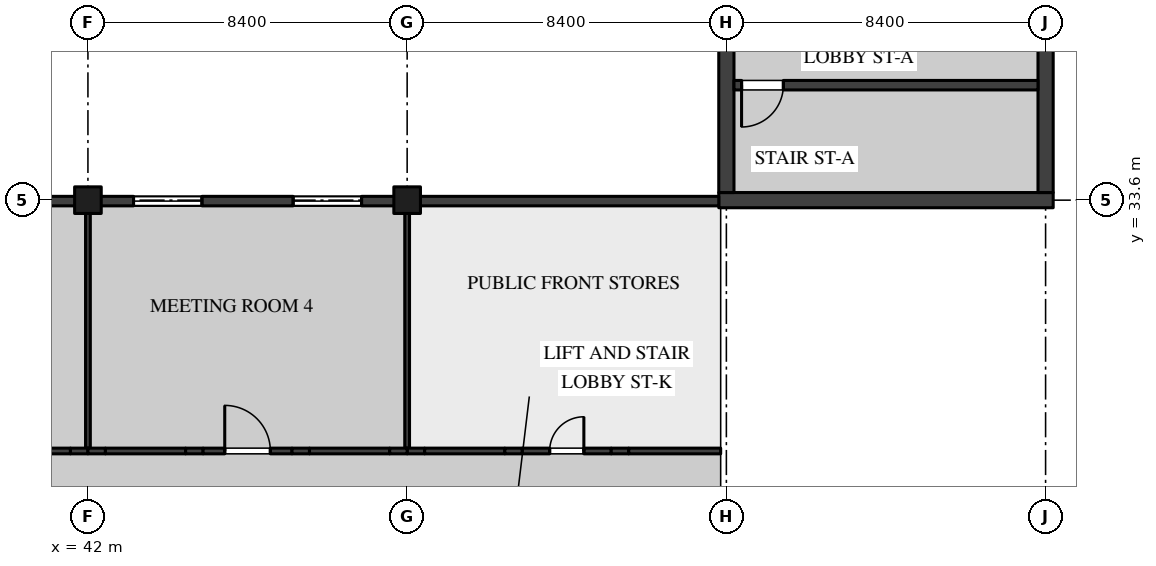
"""IFC4 building model, lengths in metres.
Left out: names, types, materials, properties, quantities, classifications, styles, units other than length and angle.
Written with IfcOpenShell. Run it as: python <this file> out.ifc"""

import sys

from ifc_helpers import new_model, si_unit, direction, frame, frame_2d, origin, origin_2d, place, context, subcontext, project, spatial, rectangle, extrude, element, fill, save


model = new_model("IFC4")
c1 = context("Model", 3, precision=1e-05, world=origin(), true_north=direction((0.0, 1.0)))
c2 = subcontext(c1, "Body", "Model", "MODEL_VIEW")
j1 = project(units=[si_unit("LENGTHUNIT", "METRE"), si_unit("PLANEANGLEUNIT", "RADIAN")], contexts=[c1])
p1 = place(None, origin())
s1 = spatial("IfcSite", under=j1, at=p1, CompositionType="ELEMENT")
p2 = place(p1, origin())
s2 = spatial("IfcBuilding", under=s1, at=p2, CompositionType="ELEMENT")
p3 = place(p2, frame((0.0, 0.0, 5.4)))
s3 = spatial("IfcBuildingStorey", under=s2, at=p3, CompositionType="ELEMENT", Elevation=5.4)
for number, where, z_axis, x_axis in (
    (1, (42.0, 33.6, 0.0), (0.0, 0.0, 1.0), (1.0, 0.0, 0.0)),
    (2, (50.4, 33.6, 0.0), (0.0, 0.0, 1.0), (1.0, 0.0, 0.0)),
):
    element("IfcColumn", number, at=place(p3, frame(where, z_axis=z_axis, x_axis=x_axis)), inside=s3, PredefinedType="COLUMN", context=c2, shape_type="SweptSolid", body=[
        extrude(rectangle(XDim=0.7, YDim=0.7, at=origin_2d()), origin(), (0.0, 0.0, 1.0), 4.37),
    ])
p4 = place(p3, frame((58.6, 33.6, 0.0), z_axis=(0.0, 0.0, 1.0), x_axis=(1.0, 0.0, 0.0)))
e3 = element("IfcWall", 3, at=p4, inside=s3, PredefinedType="SHEAR", context=c2, shape_type="SweptSolid", body=[
    extrude(rectangle(XDim=8.8, YDim=0.4, at=frame_2d((4.4, 0.0))), origin(), (0.0, 0.0, 1.0), 4.25),
])
for number, where, z_axis, x_axis in (
    (4, (58.8, 33.8, 0.0), (0.0, 0.0, 1.0), (0.0, 1.0, 0.0)),
    (5, (67.2, 33.8, 0.0), (0.0, 0.0, 1.0), (0.0, 1.0, 0.0)),
):
    element("IfcWall", number, at=place(p3, frame(where, z_axis=z_axis, x_axis=x_axis)), inside=s3, PredefinedType="SHEAR", context=c2, shape_type="SweptSolid", body=[
        extrude(rectangle(XDim=8.0, YDim=0.4, at=frame_2d((4.0, 0.0))), origin(), (0.0, 0.0, 1.0), 4.25),
    ])
p5 = place(p3, frame((59.0, 36.625, 0.0), z_axis=(0.0, 0.0, 1.0), x_axis=(1.0, 0.0, 0.0)))
e6 = element("IfcWall", 6, at=p5, inside=s3, PredefinedType="SOLIDWALL", context=c2, shape_type="SweptSolid", body=[
    extrude(rectangle(XDim=8.0, YDim=0.25, at=frame_2d((4.0, 0.0))), origin(), (0.0, 0.0, 1.0), 4.25),
])
p6 = place(p5, frame((0.2, 0.0, 0.0)))
e7 = element("IfcOpeningElement", 7, at=p6, cuts=e6, PredefinedType="OPENING", context=c2, shape_type="SweptSolid", body=[
    extrude(rectangle(XDim=1.1, YDim=2.1, at=frame_2d((0.55, 1.05))), frame((0.0, 0.135, 0.0), z_axis=(0.0, -1.0, 0.0), x_axis=(1.0, 0.0, 0.0)), (0.0, 0.0, 1.0), 0.27),
])
p7 = place(p3, frame((42.0, 27.075, 0.0), z_axis=(0.0, 0.0, 1.0), x_axis=(0.0, 1.0, 0.0)))
e8 = element("IfcWall", 8, at=p7, inside=s3, PredefinedType="PARTITIONING", context=c2, shape_type="SweptSolid", body=[
    extrude(rectangle(XDim=6.175, YDim=0.125, at=frame_2d((3.087, 0.0))), origin(), (0.0, 0.0, 1.0), 3.746),
])
p8 = place(p3, frame((39.43, 27.0, 0.0), z_axis=(0.0, 0.0, 1.0), x_axis=(1.0, 0.0, 0.0)))
e9 = element("IfcWall", 9, at=p8, inside=s3, PredefinedType="PARTITIONING", context=c2, shape_type="SweptSolid", body=[
    extrude(rectangle(XDim=2.11, YDim=0.15, at=frame_2d((1.055, 0.0))), origin(), (0.0, 0.0, 1.0), 4.37),
])
p9 = place(p3, frame((41.54, 27.0, 0.0), z_axis=(0.0, 0.0, 1.0), x_axis=(1.0, 0.0, 0.0)))
e10 = element("IfcWall", 10, at=p9, inside=s3, PredefinedType="PARTITIONING", context=c2, shape_type="SweptSolid", body=[
    extrude(rectangle(XDim=0.46, YDim=0.15, at=frame_2d((0.23, 0.0))), origin(), (0.0, 0.0, 1.0), 3.746),
])
p10 = place(p3, frame((50.4, 27.075, 0.0), z_axis=(0.0, 0.0, 1.0), x_axis=(0.0, 1.0, 0.0)))
e11 = element("IfcWall", 11, at=p10, inside=s3, PredefinedType="PARTITIONING", context=c2, shape_type="SweptSolid", body=[
    extrude(rectangle(XDim=6.175, YDim=0.125, at=frame_2d((3.087, 0.0))), origin(), (0.0, 0.0, 1.0), 3.746),
])
p11 = place(p3, frame((50.4, 27.0, 0.0), z_axis=(0.0, 0.0, 1.0), x_axis=(1.0, 0.0, 0.0)))
e12 = element("IfcWall", 12, at=p11, inside=s3, PredefinedType="PARTITIONING", context=c2, shape_type="SweptSolid", body=[
    extrude(rectangle(XDim=0.46, YDim=0.15, at=frame_2d((0.23, 0.0))), origin(), (0.0, 0.0, 1.0), 3.746),
])
p12 = place(p3, frame((50.86, 27.0, 0.0), z_axis=(0.0, 0.0, 1.0), x_axis=(1.0, 0.0, 0.0)))
e13 = element("IfcWall", 13, at=p12, inside=s3, PredefinedType="PARTITIONING", context=c2, shape_type="SweptSolid", body=[
    extrude(rectangle(XDim=2.11, YDim=0.15, at=frame_2d((1.055, 0.0))), origin(), (0.0, 0.0, 1.0), 4.37),
])
p13 = place(p3, frame((52.97, 27.0, 0.0), z_axis=(0.0, 0.0, 1.0), x_axis=(1.0, 0.0, 0.0)))
e14 = element("IfcWall", 14, at=p13, inside=s3, PredefinedType="PARTITIONING", context=c2, shape_type="SweptSolid", body=[
    extrude(rectangle(XDim=0.46, YDim=0.15, at=frame_2d((0.23, 0.0))), origin(), (0.0, 0.0, 1.0), 3.895),
])
p14 = place(p3, frame((53.43, 27.0, 0.0), z_axis=(0.0, 0.0, 1.0), x_axis=(1.0, 0.0, 0.0)))
e15 = element("IfcWall", 15, at=p14, inside=s3, PredefinedType="PARTITIONING", context=c2, shape_type="SweptSolid", body=[
    extrude(rectangle(XDim=2.34, YDim=0.15, at=frame_2d((1.17, 0.0))), origin(), (0.0, 0.0, 1.0), 4.37),
])
p15 = place(p14, frame((0.72, 0.0, 0.0)))
e16 = element("IfcOpeningElement", 16, at=p15, cuts=e15, PredefinedType="OPENING", context=c2, shape_type="SweptSolid", body=[
    extrude(rectangle(XDim=0.9, YDim=2.1, at=frame_2d((0.45, 1.05))), frame((0.0, 0.085, 0.0), z_axis=(0.0, -1.0, 0.0), x_axis=(1.0, 0.0, 0.0)), (0.0, 0.0, 1.0), 0.17),
])
p16 = place(p3, frame((55.77, 27.0, 0.0), z_axis=(0.0, 0.0, 1.0), x_axis=(1.0, 0.0, 0.0)))
e17 = element("IfcWall", 17, at=p16, inside=s3, PredefinedType="PARTITIONING", context=c2, shape_type="SweptSolid", body=[
    extrude(rectangle(XDim=0.46, YDim=0.15, at=frame_2d((0.23, 0.0))), origin(), (0.0, 0.0, 1.0), 3.895),
])
p17 = place(p3, frame((56.23, 27.0, 0.0), z_axis=(0.0, 0.0, 1.0), x_axis=(1.0, 0.0, 0.0)))
e18 = element("IfcWall", 18, at=p17, inside=s3, PredefinedType="PARTITIONING", context=c2, shape_type="SweptSolid", body=[
    extrude(rectangle(XDim=2.42, YDim=0.15, at=frame_2d((1.21, 0.0))), origin(), (0.0, 0.0, 1.0), 4.37),
])
p18 = place(p3, frame((42.0, 27.0, 0.0), z_axis=(0.0, 0.0, 1.0), x_axis=(1.0, 0.0, 0.0)))
e19 = element("IfcWall", 19, at=p18, inside=s3, PredefinedType="PARTITIONING", context=c2, shape_type="SweptSolid", body=[
    extrude(rectangle(XDim=0.46, YDim=0.15, at=frame_2d((0.23, 0.0))), origin(), (0.0, 0.0, 1.0), 3.746),
])
p19 = place(p3, frame((42.46, 27.0, 0.0), z_axis=(0.0, 0.0, 1.0), x_axis=(1.0, 0.0, 0.0)))
e20 = element("IfcWall", 20, at=p19, inside=s3, PredefinedType="PARTITIONING", context=c2, shape_type="SweptSolid", body=[
    extrude(rectangle(XDim=2.11, YDim=0.15, at=frame_2d((1.055, 0.0))), origin(), (0.0, 0.0, 1.0), 4.37),
])
p20 = place(p3, frame((44.57, 27.0, 0.0), z_axis=(0.0, 0.0, 1.0), x_axis=(1.0, 0.0, 0.0)))
e21 = element("IfcWall", 21, at=p20, inside=s3, PredefinedType="PARTITIONING", context=c2, shape_type="SweptSolid", body=[
    extrude(rectangle(XDim=0.46, YDim=0.15, at=frame_2d((0.23, 0.0))), origin(), (0.0, 0.0, 1.0), 3.895),
])
p21 = place(p3, frame((45.03, 27.0, 0.0), z_axis=(0.0, 0.0, 1.0), x_axis=(1.0, 0.0, 0.0)))
e22 = element("IfcWall", 22, at=p21, inside=s3, PredefinedType="PARTITIONING", context=c2, shape_type="SweptSolid", body=[
    extrude(rectangle(XDim=2.34, YDim=0.15, at=frame_2d((1.17, 0.0))), origin(), (0.0, 0.0, 1.0), 4.37),
])
p22 = place(p21, frame((0.57, 0.0, 0.0)))
e23 = element("IfcOpeningElement", 23, at=p22, cuts=e22, PredefinedType="OPENING", context=c2, shape_type="SweptSolid", body=[
    extrude(rectangle(XDim=1.2, YDim=2.4, at=frame_2d((0.6, 1.2))), frame((0.0, 0.085, 0.0), z_axis=(0.0, -1.0, 0.0), x_axis=(1.0, 0.0, 0.0)), (0.0, 0.0, 1.0), 0.17),
])
p23 = place(p3, frame((47.37, 27.0, 0.0), z_axis=(0.0, 0.0, 1.0), x_axis=(1.0, 0.0, 0.0)))
e24 = element("IfcWall", 24, at=p23, inside=s3, PredefinedType="PARTITIONING", context=c2, shape_type="SweptSolid", body=[
    extrude(rectangle(XDim=0.46, YDim=0.15, at=frame_2d((0.23, 0.0))), origin(), (0.0, 0.0, 1.0), 3.895),
])
p24 = place(p3, frame((47.83, 27.0, 0.0), z_axis=(0.0, 0.0, 1.0), x_axis=(1.0, 0.0, 0.0)))
e25 = element("IfcWall", 25, at=p24, inside=s3, PredefinedType="PARTITIONING", context=c2, shape_type="SweptSolid", body=[
    extrude(rectangle(XDim=2.11, YDim=0.15, at=frame_2d((1.055, 0.0))), origin(), (0.0, 0.0, 1.0), 4.37),
])
p25 = place(p3, frame((49.94, 27.0, 0.0), z_axis=(0.0, 0.0, 1.0), x_axis=(1.0, 0.0, 0.0)))
e26 = element("IfcWall", 26, at=p25, inside=s3, PredefinedType="PARTITIONING", context=c2, shape_type="SweptSolid", body=[
    extrude(rectangle(XDim=0.46, YDim=0.15, at=frame_2d((0.23, 0.0))), origin(), (0.0, 0.0, 1.0), 3.746),
])
p26 = place(p3, frame((58.6, 33.575, 0.0), z_axis=(0.0, 0.0, 1.0), x_axis=(-1.0, 0.0, 0.0)))
e27 = element("IfcWall", 27, at=p26, inside=s3, PredefinedType="SOLIDWALL", context=c2, shape_type="SweptSolid", body=[
    extrude(rectangle(XDim=7.87, YDim=0.25, at=frame_2d((3.935, 0.0))), origin(), (0.0, 0.0, 1.0), 3.746),
])
p27 = place(p3, frame((50.07, 33.575, 0.0), z_axis=(0.0, 0.0, 1.0), x_axis=(-1.0, 0.0, 0.0)))
e28 = element("IfcWall", 28, at=p27, inside=s3, PredefinedType="SOLIDWALL", context=c2, shape_type="SweptSolid", body=[
    extrude(rectangle(XDim=7.74, YDim=0.25, at=frame_2d((3.87, 0.0))), origin(), (0.0, 0.0, 1.0), 3.746),
])
p28 = place(p27, frame((0.87, 0.0, 0.9)))
e29 = element("IfcOpeningElement", 29, at=p28, cuts=e28, PredefinedType="OPENING", context=c2, shape_type="SweptSolid", body=[
    extrude(rectangle(XDim=1.8, YDim=2.4, at=frame_2d((0.9, 1.2))), frame((0.0, 0.135, 0.0), z_axis=(0.0, -1.0, 0.0), x_axis=(1.0, 0.0, 0.0)), (0.0, 0.0, 1.0), 0.27),
])
p29 = place(p27, frame((5.07, 0.0, 0.9)))
e30 = element("IfcOpeningElement", 30, at=p29, cuts=e28, PredefinedType="OPENING", context=c2, shape_type="SweptSolid", body=[
    extrude(rectangle(XDim=1.8, YDim=2.4, at=frame_2d((0.9, 1.2))), frame((0.0, 0.135, 0.0), z_axis=(0.0, -1.0, 0.0), x_axis=(1.0, 0.0, 0.0)), (0.0, 0.0, 1.0), 0.27),
])
p30 = place(p3, frame((41.67, 33.575, 0.0), z_axis=(0.0, 0.0, 1.0), x_axis=(-1.0, 0.0, 0.0)))
e31 = element("IfcWall", 31, at=p30, inside=s3, PredefinedType="SOLIDWALL", context=c2, shape_type="SweptSolid", body=[
    extrude(rectangle(XDim=7.69, YDim=0.25, at=frame_2d((3.845, 0.0))), origin(), (0.0, 0.0, 1.0), 3.746),
])
p31 = place(p30, frame((0.87, 0.0, 0.9)))
e32 = element("IfcOpeningElement", 32, at=p31, cuts=e31, PredefinedType="OPENING", context=c2, shape_type="SweptSolid", body=[
    extrude(rectangle(XDim=1.8, YDim=2.4, at=frame_2d((0.9, 1.2))), frame((0.0, 0.135, 0.0), z_axis=(0.0, -1.0, 0.0), x_axis=(1.0, 0.0, 0.0)), (0.0, 0.0, 1.0), 0.27),
])
p32 = place(p30, frame((4.77, 0.0, 0.9)))
e33 = element("IfcOpeningElement", 33, at=p32, cuts=e31, PredefinedType="OPENING", context=c2, shape_type="SweptSolid", body=[
    extrude(rectangle(XDim=2.4, YDim=2.4, at=frame_2d((1.2, 1.2))), frame((0.0, 0.135, 0.0), z_axis=(0.0, -1.0, 0.0), x_axis=(1.0, 0.0, 0.0)), (0.0, 0.0, 1.0), 0.27),
])
p33 = place(p6, frame((1.1, 0.0, 0.0), z_axis=(0.0, 0.0, 1.0), x_axis=(-1.0, 0.0, 0.0)))
e34 = element("IfcDoor", 34, at=p33, inside=s3, OperationType="SINGLE_SWING_LEFT", PredefinedType="DOOR", context=c2, shape_type="SweptSolid", body=[
    extrude(rectangle(XDim=1.1, YDim=2.1, at=frame_2d((0.55, 1.05))), frame((0.0, 0.035, 0.0), z_axis=(0.0, -1.0, 0.0), x_axis=(1.0, 0.0, 0.0)), (0.0, 0.0, 1.0), 0.07),
])
fill(e7, e34)
p34 = place(p15, origin())
e35 = element("IfcDoor", 35, at=p34, inside=s3, OperationType="SINGLE_SWING_LEFT", PredefinedType="DOOR", context=c2, shape_type="SweptSolid", body=[
    extrude(rectangle(XDim=0.9, YDim=2.1, at=frame_2d((0.45, 1.05))), frame((0.0, 0.025, 0.0), z_axis=(0.0, -1.0, 0.0), x_axis=(1.0, 0.0, 0.0)), (0.0, 0.0, 1.0), 0.05),
])
fill(e16, e35)
p35 = place(p22, origin())
e36 = element("IfcDoor", 36, at=p35, inside=s3, OperationType="SINGLE_SWING_RIGHT", PredefinedType="DOOR", context=c2, shape_type="SweptSolid", body=[
    extrude(rectangle(XDim=1.2, YDim=2.4, at=frame_2d((0.6, 1.2))), frame((0.0, 0.025, 0.0), z_axis=(0.0, -1.0, 0.0), x_axis=(1.0, 0.0, 0.0)), (0.0, 0.0, 1.0), 0.05),
])
fill(e23, e36)
p36 = place(p28, origin())
e37 = element("IfcWindow", 37, at=p36, inside=s3, PartitioningType="SINGLE_PANEL", PredefinedType="WINDOW", context=c2, shape_type="SweptSolid", body=[
    extrude(rectangle(XDim=1.8, YDim=2.4, at=frame_2d((0.9, 1.2))), frame((0.0, 0.03, 0.0), z_axis=(0.0, -1.0, 0.0), x_axis=(1.0, 0.0, 0.0)), (0.0, 0.0, 1.0), 0.06),
])
fill(e29, e37)
p37 = place(p29, origin())
e38 = element("IfcWindow", 38, at=p37, inside=s3, PartitioningType="SINGLE_PANEL", PredefinedType="WINDOW", context=c2, shape_type="SweptSolid", body=[
    extrude(rectangle(XDim=1.8, YDim=2.4, at=frame_2d((0.9, 1.2))), frame((0.0, 0.03, 0.0), z_axis=(0.0, -1.0, 0.0), x_axis=(1.0, 0.0, 0.0)), (0.0, 0.0, 1.0), 0.06),
])
fill(e30, e38)
save(model, sys.argv[1])
